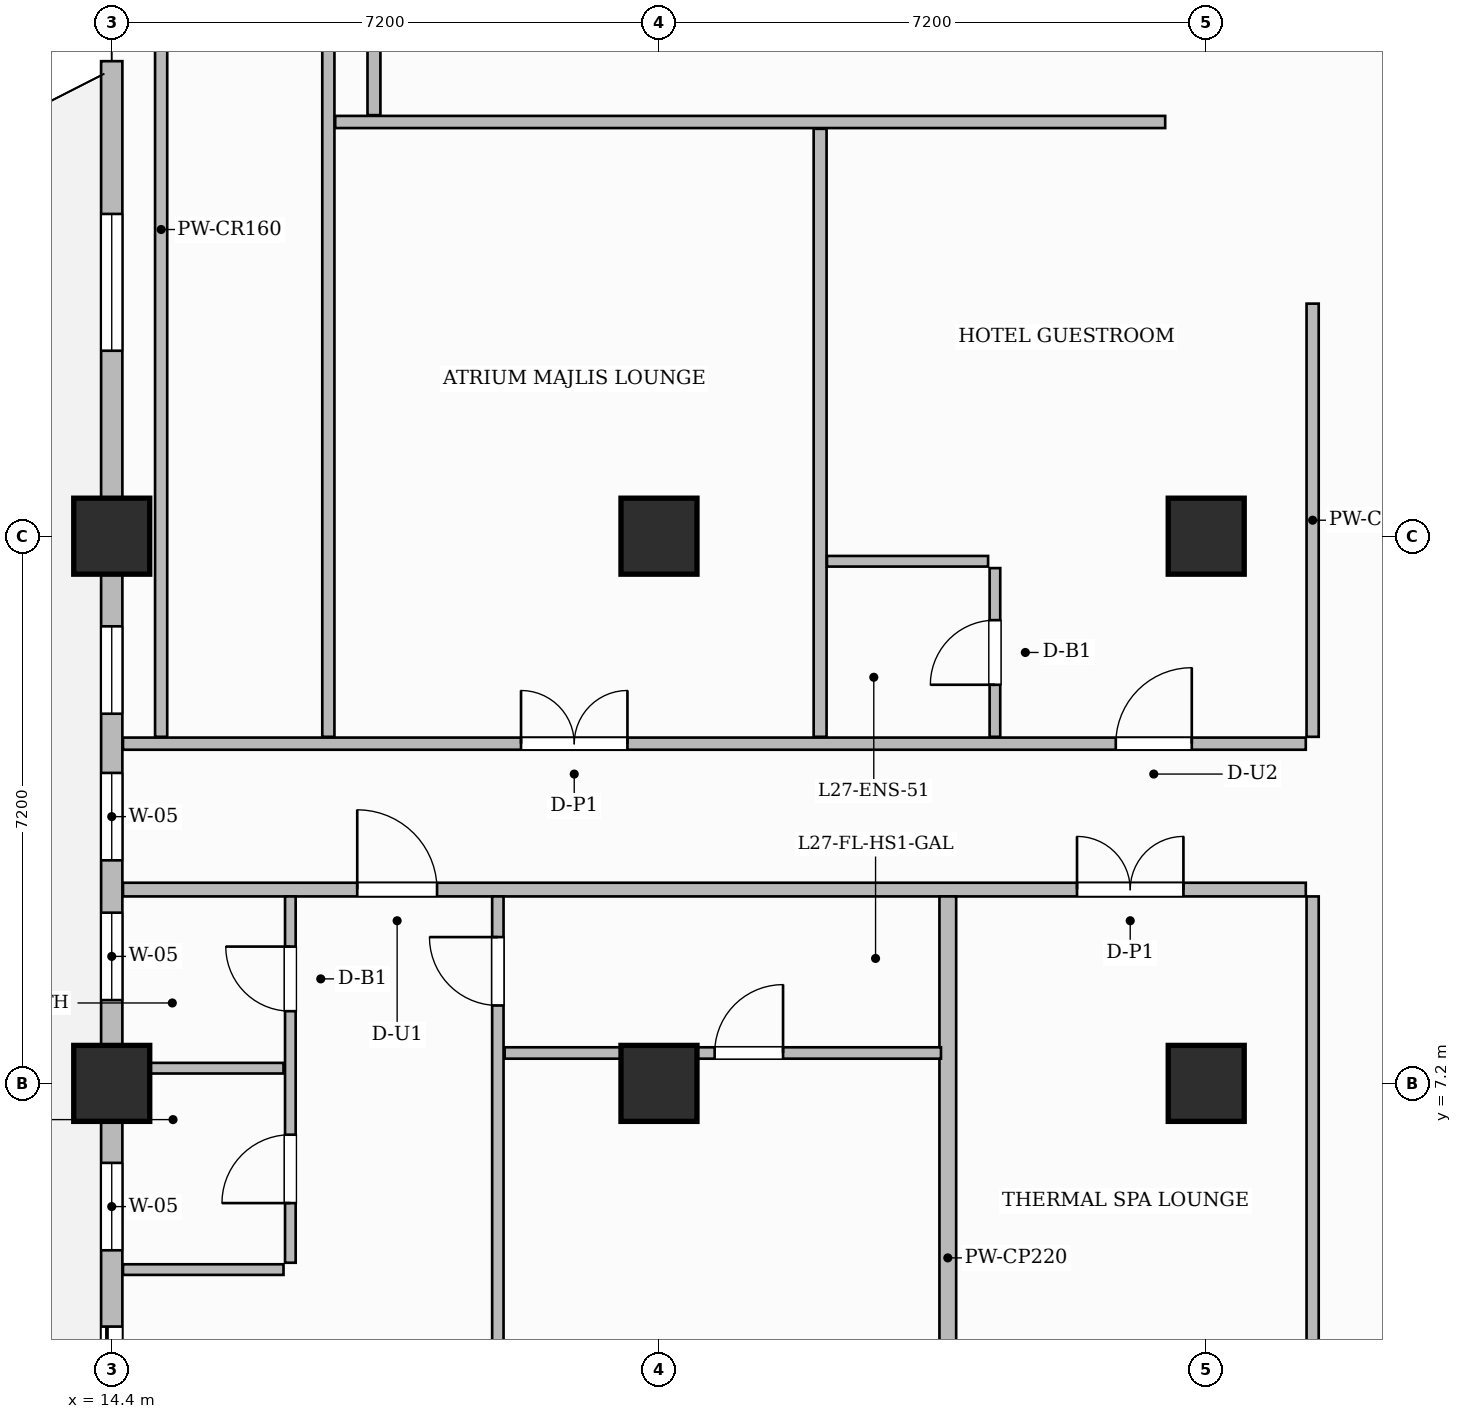
"""IFC4 building model, lengths in metres.
Left out: names, types, materials, properties, quantities, classifications, styles, units other than length and angle.
Written with IfcOpenShell. Run it as: python <this file> out.ifc"""

import sys

from ifc_helpers import new_model, si_unit, direction, frame, frame_2d, origin, origin_2d, place, context, subcontext, project, spatial, rectangle, extrude, source, transform, mapped, element, fill, save


model = new_model("IFC4")
c1 = context("Model", 3, precision=1e-05, world=origin(), true_north=direction((0.0, 1.0)))
c2 = subcontext(c1, "Body", "Model", "MODEL_VIEW")
j1 = project(units=[si_unit("LENGTHUNIT", "METRE"), si_unit("PLANEANGLEUNIT", "RADIAN")], contexts=[c1])
p1 = place(None, origin())
s1 = spatial("IfcSite", under=j1, at=p1, CompositionType="ELEMENT")
p2 = place(p1, origin())
s2 = spatial("IfcBuilding", under=s1, at=p2, CompositionType="ELEMENT")
p3 = place(p2, frame((0.0, 0.0, 111.8)))
s3 = spatial("IfcBuildingStorey", under=s2, at=p3, CompositionType="ELEMENT", Elevation=111.8)
m1 = source(origin(), c2, "Body", "SweptSolid", [
    extrude(rectangle(XDim=1.0, YDim=1.0, at=origin_2d()), origin(), (0.0, 0.0, 1.0), 3.7),
])
for number, where, z_axis, x_axis in (
    (1, (14.4, 7.2, 0.0), (0.0, 0.0, 1.0), (1.0, 0.0, 0.0)),
    (2, (14.4, 14.4, 0.0), (0.0, 0.0, 1.0), (1.0, 0.0, 0.0)),
    (3, (21.6, 7.2, 0.0), (0.0, 0.0, 1.0), (1.0, 0.0, 0.0)),
    (4, (21.6, 14.4, 0.0), (0.0, 0.0, 1.0), (1.0, 0.0, 0.0)),
    (5, (28.8, 7.2, 0.0), (0.0, 0.0, 1.0), (1.0, 0.0, 0.0)),
    (6, (28.8, 14.4, 0.0), (0.0, 0.0, 1.0), (1.0, 0.0, 0.0)),
):
    element("IfcColumn", number, at=place(p3, frame(where, z_axis=z_axis, x_axis=x_axis)), inside=s3, PredefinedType="COLUMN", context=c2, shape_type="MappedRepresentation", body=[
        mapped(m1, transform((0.0, 0.0, 0.0), scale=1.0)),
    ])
p4 = place(p3, frame((14.548, 9.75, 0.0), z_axis=(0.0, 0.0, 1.0), x_axis=(1.0, 0.0, 0.0)))
e7 = element("IfcWall", 7, at=p4, inside=s3, PredefinedType="PARTITIONING", context=c2, shape_type="SweptSolid", body=[
    extrude(rectangle(XDim=15.562, YDim=0.18, at=frame_2d((7.781, 0.0))), origin(), (0.0, 0.0, 1.0), 3.45),
])
p5 = place(p4, frame((3.082, 0.0, 0.0)))
e8 = element("IfcOpeningElement", 8, at=p5, cuts=e7, PredefinedType="OPENING", context=c2, shape_type="SweptSolid", body=[
    extrude(rectangle(XDim=1.05, YDim=2.25, at=frame_2d((0.525, 1.125))), frame((0.0, 0.1, 0.0), z_axis=(0.0, -1.0, 0.0), x_axis=(1.0, 0.0, 0.0)), (0.0, 0.0, 1.0), 0.2),
])
p6 = place(p4, frame((12.552, 0.0, 0.0)))
e9 = element("IfcOpeningElement", 9, at=p6, cuts=e7, PredefinedType="OPENING", context=c2, shape_type="SweptSolid", body=[
    extrude(rectangle(XDim=1.4, YDim=2.35, at=frame_2d((0.7, 1.175))), frame((0.0, 0.1, 0.0), z_axis=(0.0, -1.0, 0.0), x_axis=(1.0, 0.0, 0.0)), (0.0, 0.0, 1.0), 0.2),
])
p7 = place(p3, frame((14.548, 11.67, 0.0), z_axis=(0.0, 0.0, 1.0), x_axis=(1.0, 0.0, 0.0)))
e10 = element("IfcWall", 10, at=p7, inside=s3, PredefinedType="PARTITIONING", context=c2, shape_type="SweptSolid", body=[
    extrude(rectangle(XDim=15.562, YDim=0.16, at=frame_2d((7.781, 0.0))), origin(), (0.0, 0.0, 1.0), 3.45),
])
p8 = place(p7, frame((5.237, 0.0, 0.0)))
e11 = element("IfcOpeningElement", 11, at=p8, cuts=e10, PredefinedType="OPENING", context=c2, shape_type="SweptSolid", body=[
    extrude(rectangle(XDim=1.4, YDim=2.35, at=frame_2d((0.7, 1.175))), frame((0.0, 0.09, 0.0), z_axis=(0.0, -1.0, 0.0), x_axis=(1.0, 0.0, 0.0)), (0.0, 0.0, 1.0), 0.18),
])
p9 = place(p7, frame((13.062, 0.0, 0.0)))
e12 = element("IfcOpeningElement", 12, at=p9, cuts=e10, PredefinedType="OPENING", context=c2, shape_type="SweptSolid", body=[
    extrude(rectangle(XDim=1.0, YDim=2.2, at=frame_2d((0.5, 1.1))), frame((0.0, 0.09, 0.0), z_axis=(0.0, -1.0, 0.0), x_axis=(1.0, 0.0, 0.0)), (0.0, 0.0, 1.0), 0.18),
])
p10 = place(p3, frame((30.2, 11.76, 0.0), z_axis=(0.0, 0.0, 1.0), x_axis=(0.0, 1.0, 0.0)))
e13 = element("IfcWall", 13, at=p10, inside=s3, PredefinedType="PARTITIONING", context=c2, shape_type="SweptSolid", body=[
    extrude(rectangle(XDim=5.7, YDim=0.16, at=frame_2d((2.85, 0.0))), origin(), (0.0, 0.0, 1.0), 3.45),
])
p11 = place(p3, frame((30.2, 0.148, 0.0), z_axis=(0.0, 0.0, 1.0), x_axis=(0.0, 1.0, 0.0)))
e14 = element("IfcWall", 14, at=p11, inside=s3, PredefinedType="PARTITIONING", context=c2, shape_type="SweptSolid", body=[
    extrude(rectangle(XDim=9.512, YDim=0.16, at=frame_2d((4.756, 0.0))), origin(), (0.0, 0.0, 1.0), 3.45),
])
p12 = place(p11, frame((1.977, 0.0, 0.0)))
e15 = element("IfcOpeningElement", 15, at=p12, cuts=e14, PredefinedType="OPENING", context=c2, shape_type="SweptSolid", body=[
    extrude(rectangle(XDim=1.05, YDim=2.15, at=frame_2d((0.525, 1.075))), frame((0.0, 0.09, 0.0), z_axis=(0.0, -1.0, 0.0), x_axis=(1.0, 0.0, 0.0)), (0.0, 0.0, 1.0), 0.18),
])
p13 = place(p3, frame((25.4, 0.148, 0.0), z_axis=(0.0, 0.0, 1.0), x_axis=(0.0, 1.0, 0.0)))
e16 = element("IfcWall", 16, at=p13, inside=s3, PredefinedType="PARTITIONING", context=c2, shape_type="SweptSolid", body=[
    extrude(rectangle(XDim=9.512, YDim=0.22, at=frame_2d((4.756, 0.0))), origin(), (0.0, 0.0, 1.0), 3.105),
])
p14 = place(p3, frame((16.75, 4.84, 0.0), z_axis=(0.0, 0.0, 1.0), x_axis=(0.0, 1.0, 0.0)))
e17 = element("IfcWall", 17, at=p14, inside=s3, PredefinedType="PARTITIONING", context=c2, shape_type="SweptSolid", body=[
    extrude(rectangle(XDim=4.82, YDim=0.14, at=frame_2d((2.41, 0.0))), origin(), (0.0, 0.0, 1.0), 3.45),
])
p15 = place(p14, frame((0.785, 0.0, 0.0)))
e18 = element("IfcOpeningElement", 18, at=p15, cuts=e17, PredefinedType="OPENING", context=c2, shape_type="SweptSolid", body=[
    extrude(rectangle(XDim=0.9, YDim=2.15, at=frame_2d((0.45, 1.075))), frame((0.0, 0.08, 0.0), z_axis=(0.0, -1.0, 0.0), x_axis=(1.0, 0.0, 0.0)), (0.0, 0.0, 1.0), 0.16),
])
p16 = place(p14, frame((3.31, 0.0, 0.0)))
e19 = element("IfcOpeningElement", 19, at=p16, cuts=e17, PredefinedType="OPENING", context=c2, shape_type="SweptSolid", body=[
    extrude(rectangle(XDim=0.85, YDim=2.1, at=frame_2d((0.425, 1.05))), frame((0.0, 0.08, 0.0), z_axis=(0.0, -1.0, 0.0), x_axis=(1.0, 0.0, 0.0)), (0.0, 0.0, 1.0), 0.16),
])
p17 = place(p3, frame((14.59, 7.4, 0.0), z_axis=(0.0, 0.0, 1.0), x_axis=(1.0, 0.0, 0.0)))
e20 = element("IfcWall", 20, at=p17, inside=s3, PredefinedType="PARTITIONING", context=c2, shape_type="SweptSolid", body=[
    extrude(rectangle(XDim=2.07, YDim=0.14, at=frame_2d((1.035, 0.0))), origin(), (0.0, 0.0, 1.0), 2.935),
])
p18 = place(p3, frame((14.548, 4.75, 0.0), z_axis=(0.0, 0.0, 1.0), x_axis=(1.0, 0.0, 0.0)))
e21 = element("IfcWall", 21, at=p18, inside=s3, PredefinedType="PARTITIONING", context=c2, shape_type="SweptSolid", body=[
    extrude(rectangle(XDim=2.112, YDim=0.14, at=frame_2d((1.056, 0.0))), origin(), (0.0, 0.0, 1.0), 3.45),
])
p19 = place(p3, frame((19.48, 0.148, 0.0), z_axis=(0.0, 0.0, 1.0), x_axis=(0.0, 1.0, 0.0)))
e22 = element("IfcWall", 22, at=p19, inside=s3, PredefinedType="PARTITIONING", context=c2, shape_type="SweptSolid", body=[
    extrude(rectangle(XDim=9.512, YDim=0.15, at=frame_2d((4.756, 0.0))), origin(), (0.0, 0.0, 1.0), 3.45),
])
p20 = place(p19, frame((8.077, 0.0, 0.0)))
e23 = element("IfcOpeningElement", 23, at=p20, cuts=e22, PredefinedType="OPENING", context=c2, shape_type="SweptSolid", body=[
    extrude(rectangle(XDim=0.9, YDim=2.15, at=frame_2d((0.45, 1.075))), frame((0.0, 0.085, 0.0), z_axis=(0.0, -1.0, 0.0), x_axis=(1.0, 0.0, 0.0)), (0.0, 0.0, 1.0), 0.17),
])
p21 = place(p3, frame((19.57, 7.6, 0.0), z_axis=(0.0, 0.0, 1.0), x_axis=(1.0, 0.0, 0.0)))
e24 = element("IfcWall", 24, at=p21, inside=s3, PredefinedType="PARTITIONING", context=c2, shape_type="SweptSolid", body=[
    extrude(rectangle(XDim=5.74, YDim=0.15, at=frame_2d((2.87, 0.0))), origin(), (0.0, 0.0, 1.0), 3.45),
])
p22 = place(p21, frame((2.762, 0.0, 0.0)))
e25 = element("IfcOpeningElement", 25, at=p22, cuts=e24, PredefinedType="OPENING", context=c2, shape_type="SweptSolid", body=[
    extrude(rectangle(XDim=0.9, YDim=2.15, at=frame_2d((0.45, 1.075))), frame((0.0, 0.085, 0.0), z_axis=(0.0, -1.0, 0.0), x_axis=(1.0, 0.0, 0.0)), (0.0, 0.0, 1.0), 0.17),
])
for number, where, z_axis, x_axis in (
    (26, (15.05, 11.76, 0.0), (0.0, 0.0, 1.0), (0.0, 1.0, 0.0)),
    (27, (17.25, 11.76, 0.0), (0.0, 0.0, 1.0), (0.0, 1.0, 0.0)),
):
    element("IfcWall", number, at=place(p3, frame(where, z_axis=z_axis, x_axis=x_axis)), inside=s3, PredefinedType="PARTITIONING", context=c2, shape_type="SweptSolid", body=[
        extrude(rectangle(XDim=13.35, YDim=0.16, at=frame_2d((6.675, 0.0))), origin(), (0.0, 0.0, 1.0), 3.45),
    ])
p23 = place(p3, frame((17.85, 19.94, 0.0), z_axis=(0.0, 0.0, 1.0), x_axis=(0.0, 1.0, 0.0)))
e28 = element("IfcWall", 28, at=p23, inside=s3, PredefinedType="PARTITIONING", context=c2, shape_type="SweptSolid", body=[
    extrude(rectangle(XDim=5.22, YDim=0.17, at=frame_2d((2.61, 0.0))), origin(), (0.0, 0.0, 1.0), 3.105),
])
p24 = place(p3, frame((17.34, 19.85, 0.0), z_axis=(0.0, 0.0, 1.0), x_axis=(1.0, 0.0, 0.0)))
e29 = element("IfcWall", 29, at=p24, inside=s3, PredefinedType="PARTITIONING", context=c2, shape_type="SweptSolid", body=[
    extrude(rectangle(XDim=10.92, YDim=0.16, at=frame_2d((5.46, 0.0))), origin(), (0.0, 0.0, 1.0), 3.45),
])
p25 = place(p3, frame((23.72, 11.76, 0.0), z_axis=(0.0, 0.0, 1.0), x_axis=(0.0, 1.0, 0.0)))
e30 = element("IfcWall", 30, at=p25, inside=s3, PredefinedType="PARTITIONING", context=c2, shape_type="SweptSolid", body=[
    extrude(rectangle(XDim=8.0, YDim=0.17, at=frame_2d((4.0, 0.0))), origin(), (0.0, 0.0, 1.0), 3.45),
])
p26 = place(p3, frame((26.02, 11.76, 0.0), z_axis=(0.0, 0.0, 1.0), x_axis=(0.0, 1.0, 0.0)))
e31 = element("IfcWall", 31, at=p26, inside=s3, PredefinedType="PARTITIONING", context=c2, shape_type="SweptSolid", body=[
    extrude(rectangle(XDim=2.22, YDim=0.14, at=frame_2d((1.11, 0.0))), origin(), (0.0, 0.0, 1.0), 3.45),
])
p27 = place(p26, frame((0.685, 0.0, 0.0)))
e32 = element("IfcOpeningElement", 32, at=p27, cuts=e31, PredefinedType="OPENING", context=c2, shape_type="SweptSolid", body=[
    extrude(rectangle(XDim=0.85, YDim=2.1, at=frame_2d((0.425, 1.05))), frame((0.0, 0.08, 0.0), z_axis=(0.0, -1.0, 0.0), x_axis=(1.0, 0.0, 0.0)), (0.0, 0.0, 1.0), 0.16),
])
p28 = place(p3, frame((23.81, 14.07, 0.0), z_axis=(0.0, 0.0, 1.0), x_axis=(1.0, 0.0, 0.0)))
e33 = element("IfcWall", 33, at=p28, inside=s3, PredefinedType="PARTITIONING", context=c2, shape_type="SweptSolid", body=[
    extrude(rectangle(XDim=2.12, YDim=0.14, at=frame_2d((1.06, 0.0))), origin(), (0.0, 0.0, 1.0), 3.45),
])
p29 = place(p3, frame((14.4, 0.05, 0.0), z_axis=(0.0, 0.0, 1.0), x_axis=(0.0, 1.0, 0.0)))
e34 = element("IfcWall", 34, at=p29, inside=s3, PredefinedType="SOLIDWALL", context=c2, shape_type="SweptSolid", body=[
    extrude(rectangle(XDim=20.6, YDim=0.28, at=frame_2d((10.3, 0.0))), origin(), (0.0, 0.0, 1.0), 2.935),
])
p30 = place(p29, frame((2.75, 0.0, 0.0)))
e35 = element("IfcOpeningElement", 35, at=p30, cuts=e34, PredefinedType="OPENING", context=c2, shape_type="SweptSolid", body=[
    extrude(rectangle(XDim=1.2, YDim=2.2, at=frame_2d((0.6, 1.1))), frame((0.0, 0.15, 0.0), z_axis=(0.0, -1.0, 0.0), x_axis=(1.0, 0.0, 0.0)), (0.0, 0.0, 1.0), 0.3),
])
p31 = place(p29, frame((1.025, 0.0, 0.8)))
e36 = element("IfcOpeningElement", 36, at=p31, cuts=e34, PredefinedType="OPENING", context=c2, shape_type="SweptSolid", body=[
    extrude(rectangle(XDim=1.15, YDim=1.8, at=frame_2d((0.575, 0.9))), frame((0.0, 0.15, 0.0), z_axis=(0.0, -1.0, 0.0), x_axis=(1.0, 0.0, 0.0)), (0.0, 0.0, 1.0), 0.3),
])
p32 = place(p29, frame((4.954, 0.0, 0.8)))
e37 = element("IfcOpeningElement", 37, at=p32, cuts=e34, PredefinedType="OPENING", context=c2, shape_type="SweptSolid", body=[
    extrude(rectangle(XDim=1.15, YDim=1.8, at=frame_2d((0.575, 0.9))), frame((0.0, 0.15, 0.0), z_axis=(0.0, -1.0, 0.0), x_axis=(1.0, 0.0, 0.0)), (0.0, 0.0, 1.0), 0.3),
])
p33 = place(p29, frame((8.246, 0.0, 0.8)))
e38 = element("IfcOpeningElement", 38, at=p33, cuts=e34, PredefinedType="OPENING", context=c2, shape_type="SweptSolid", body=[
    extrude(rectangle(XDim=1.15, YDim=1.8, at=frame_2d((0.575, 0.9))), frame((0.0, 0.15, 0.0), z_axis=(0.0, -1.0, 0.0), x_axis=(1.0, 0.0, 0.0)), (0.0, 0.0, 1.0), 0.3),
])
p34 = place(p29, frame((10.085, 0.0, 0.8)))
e39 = element("IfcOpeningElement", 39, at=p34, cuts=e34, PredefinedType="OPENING", context=c2, shape_type="SweptSolid", body=[
    extrude(rectangle(XDim=1.15, YDim=1.8, at=frame_2d((0.575, 0.9))), frame((0.0, 0.15, 0.0), z_axis=(0.0, -1.0, 0.0), x_axis=(1.0, 0.0, 0.0)), (0.0, 0.0, 1.0), 0.3),
])
p35 = place(p29, frame((12.014, 0.0, 0.8)))
e40 = element("IfcOpeningElement", 40, at=p35, cuts=e34, PredefinedType="OPENING", context=c2, shape_type="SweptSolid", body=[
    extrude(rectangle(XDim=1.15, YDim=1.8, at=frame_2d((0.575, 0.9))), frame((0.0, 0.15, 0.0), z_axis=(0.0, -1.0, 0.0), x_axis=(1.0, 0.0, 0.0)), (0.0, 0.0, 1.0), 0.3),
])
p36 = place(p29, frame((16.79, 0.0, 0.8)))
e41 = element("IfcOpeningElement", 41, at=p36, cuts=e34, PredefinedType="OPENING", context=c2, shape_type="SweptSolid", body=[
    extrude(rectangle(XDim=1.8, YDim=1.85, at=frame_2d((0.9, 0.925))), frame((0.0, 0.15, 0.0), z_axis=(0.0, -1.0, 0.0), x_axis=(1.0, 0.0, 0.0)), (0.0, 0.0, 1.0), 0.3),
])
m2 = source(origin(), c2, "Body", "SweptSolid", [
    extrude(rectangle(XDim=0.9, YDim=2.15, at=frame_2d((0.45, 1.075))), frame((0.0, 0.025, 0.0), z_axis=(0.0, -1.0, 0.0), x_axis=(1.0, 0.0, 0.0)), (0.0, 0.0, 1.0), 0.05),
])
p37 = place(p15, origin())
e42 = element("IfcDoor", 42, at=p37, inside=s3, OperationType="SINGLE_SWING_LEFT", PredefinedType="DOOR", context=c2, shape_type="MappedRepresentation", body=[
    mapped(m2, transform((0.0, 0.0, 0.0), scale=1.0)),
])
fill(e18, e42)
m3 = source(origin(), c2, "Body", "SweptSolid", [
    extrude(rectangle(XDim=0.85, YDim=2.1, at=frame_2d((0.425, 1.05))), frame((0.0, 0.025, 0.0), z_axis=(0.0, -1.0, 0.0), x_axis=(1.0, 0.0, 0.0)), (0.0, 0.0, 1.0), 0.05),
])
p38 = place(p16, origin())
e43 = element("IfcDoor", 43, at=p38, inside=s3, OperationType="SINGLE_SWING_RIGHT", PredefinedType="DOOR", context=c2, shape_type="MappedRepresentation", body=[
    mapped(m3, transform((0.0, 0.0, 0.0), scale=1.0)),
])
fill(e19, e43)
m4 = source(origin(), c2, "Body", "SweptSolid", [
    extrude(rectangle(XDim=1.05, YDim=2.25, at=frame_2d((0.525, 1.125))), frame((0.0, 0.025, 0.0), z_axis=(0.0, -1.0, 0.0), x_axis=(1.0, 0.0, 0.0)), (0.0, 0.0, 1.0), 0.05),
])
p39 = place(p5, origin())
e44 = element("IfcDoor", 44, at=p39, inside=s3, OperationType="SINGLE_SWING_LEFT", PredefinedType="DOOR", context=c2, shape_type="MappedRepresentation", body=[
    mapped(m4, transform((0.0, 0.0, 0.0), scale=1.0)),
])
fill(e8, e44)
p40 = place(p20, origin())
e45 = element("IfcDoor", 45, at=p40, inside=s3, OperationType="SINGLE_SWING_RIGHT", PredefinedType="DOOR", context=c2, shape_type="MappedRepresentation", body=[
    mapped(m2, transform((0.0, 0.0, 0.0), scale=1.0)),
])
fill(e23, e45)
p41 = place(p22, origin())
e46 = element("IfcDoor", 46, at=p41, inside=s3, OperationType="SINGLE_SWING_RIGHT", PredefinedType="DOOR", context=c2, shape_type="MappedRepresentation", body=[
    mapped(m2, transform((0.0, 0.0, 0.0), scale=1.0)),
])
fill(e25, e46)
m5 = source(origin(), c2, "Body", "SweptSolid", [
    extrude(rectangle(XDim=1.4, YDim=2.35, at=frame_2d((0.7, 1.175))), frame((0.0, 0.025, 0.0), z_axis=(0.0, -1.0, 0.0), x_axis=(1.0, 0.0, 0.0)), (0.0, 0.0, 1.0), 0.05),
])
p42 = place(p6, origin())
e47 = element("IfcDoor", 47, at=p42, inside=s3, OperationType="DOUBLE_DOOR_SINGLE_SWING", PredefinedType="DOOR", context=c2, shape_type="MappedRepresentation", body=[
    mapped(m5, transform((0.0, 0.0, 0.0), scale=1.0)),
])
fill(e9, e47)
p43 = place(p8, origin())
e48 = element("IfcDoor", 48, at=p43, inside=s3, OperationType="DOUBLE_DOOR_SINGLE_SWING", PredefinedType="DOOR", context=c2, shape_type="MappedRepresentation", body=[
    mapped(m5, transform((0.0, 0.0, 0.0), scale=1.0)),
])
fill(e11, e48)
p44 = place(p27, origin())
e49 = element("IfcDoor", 49, at=p44, inside=s3, OperationType="SINGLE_SWING_LEFT", PredefinedType="DOOR", context=c2, shape_type="MappedRepresentation", body=[
    mapped(m3, transform((0.0, 0.0, 0.0), scale=1.0)),
])
fill(e32, e49)
m6 = source(origin(), c2, "Body", "SweptSolid", [
    extrude(rectangle(XDim=1.0, YDim=2.2, at=frame_2d((0.5, 1.1))), frame((0.0, 0.025, 0.0), z_axis=(0.0, -1.0, 0.0), x_axis=(1.0, 0.0, 0.0)), (0.0, 0.0, 1.0), 0.05),
])
p45 = place(p9, origin())
e50 = element("IfcDoor", 50, at=p45, inside=s3, OperationType="SINGLE_SWING_RIGHT", PredefinedType="DOOR", context=c2, shape_type="MappedRepresentation", body=[
    mapped(m6, transform((0.0, 0.0, 0.0), scale=1.0)),
])
fill(e12, e50)
m7 = source(origin(), c2, "Body", "SweptSolid", [
    extrude(rectangle(XDim=1.2, YDim=2.2, at=frame_2d((0.6, 1.1))), frame((0.0, 0.025, 0.0), z_axis=(0.0, -1.0, 0.0), x_axis=(1.0, 0.0, 0.0)), (0.0, 0.0, 1.0), 0.05),
])
p46 = place(p30, origin())
e51 = element("IfcDoor", 51, at=p46, inside=s3, OperationType="SLIDING_TO_LEFT", PredefinedType="DOOR", context=c2, shape_type="MappedRepresentation", body=[
    mapped(m7, transform((0.0, 0.0, 0.0), scale=1.0)),
])
fill(e35, e51)
m8 = source(origin(), c2, "Body", "SweptSolid", [
    extrude(rectangle(XDim=1.15, YDim=1.8, at=frame_2d((0.575, 0.9))), frame((0.0, 0.03, 0.0), z_axis=(0.0, -1.0, 0.0), x_axis=(1.0, 0.0, 0.0)), (0.0, 0.0, 1.0), 0.06),
])
p47 = place(p32, origin())
e52 = element("IfcWindow", 52, at=p47, inside=s3, PartitioningType="SINGLE_PANEL", PredefinedType="WINDOW", context=c2, shape_type="MappedRepresentation", body=[
    mapped(m8, transform((0.0, 0.0, 0.0), scale=1.0)),
])
fill(e37, e52)
p48 = place(p33, origin())
e53 = element("IfcWindow", 53, at=p48, inside=s3, PartitioningType="SINGLE_PANEL", PredefinedType="WINDOW", context=c2, shape_type="MappedRepresentation", body=[
    mapped(m8, transform((0.0, 0.0, 0.0), scale=1.0)),
])
fill(e38, e53)
p49 = place(p34, origin())
e54 = element("IfcWindow", 54, at=p49, inside=s3, PartitioningType="SINGLE_PANEL", PredefinedType="WINDOW", context=c2, shape_type="MappedRepresentation", body=[
    mapped(m8, transform((0.0, 0.0, 0.0), scale=1.0)),
])
fill(e39, e54)
p50 = place(p35, origin())
e55 = element("IfcWindow", 55, at=p50, inside=s3, PartitioningType="SINGLE_PANEL", PredefinedType="WINDOW", context=c2, shape_type="MappedRepresentation", body=[
    mapped(m8, transform((0.0, 0.0, 0.0), scale=1.0)),
])
fill(e40, e55)
m9 = source(origin(), c2, "Body", "SweptSolid", [
    extrude(rectangle(XDim=1.8, YDim=1.85, at=frame_2d((0.9, 0.925))), frame((0.0, 0.03, 0.0), z_axis=(0.0, -1.0, 0.0), x_axis=(1.0, 0.0, 0.0)), (0.0, 0.0, 1.0), 0.06),
])
p51 = place(p36, origin())
e56 = element("IfcWindow", 56, at=p51, inside=s3, PartitioningType="DOUBLE_PANEL_VERTICAL", PredefinedType="WINDOW", context=c2, shape_type="MappedRepresentation", body=[
    mapped(m9, transform((0.0, 0.0, 0.0), scale=1.0)),
])
fill(e41, e56)
save(model, sys.argv[1])
